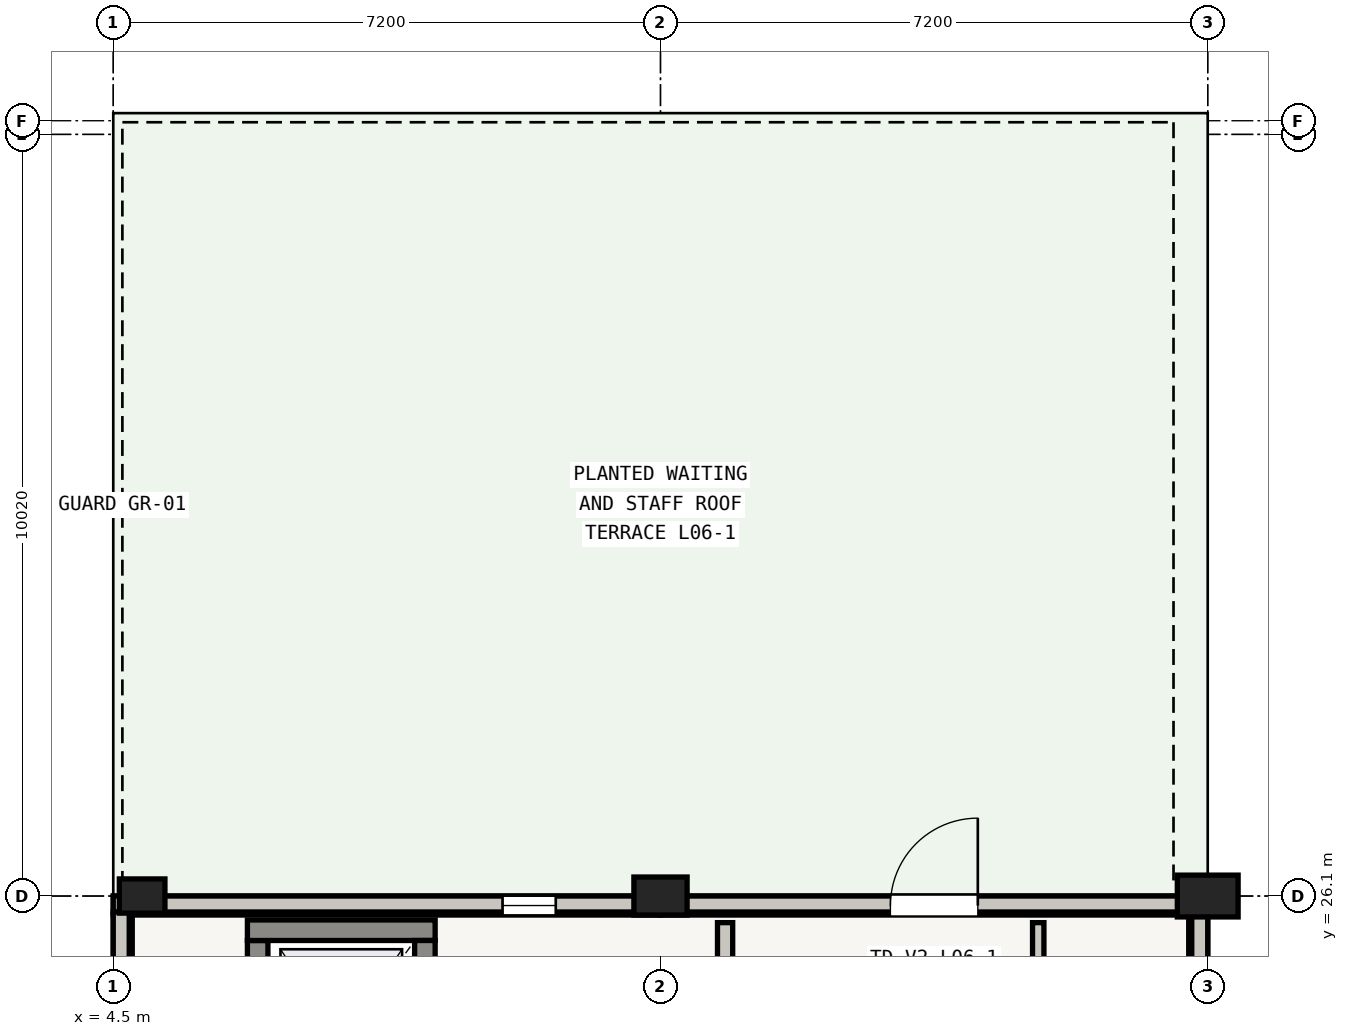
"""IFC4 building model, lengths in metres.
Left out: names, types, materials, properties, quantities, classifications, styles, units other than length and angle.
Written with IfcOpenShell. Run it as: python <this file> out.ifc"""

import sys

from ifc_helpers import new_model, si_unit, direction, frame, frame_2d, origin, origin_2d, place, context, subcontext, project, spatial, rectangle, extrude, element, fill, save


model = new_model("IFC4")
c1 = context("Model", 3, precision=1e-05, world=origin(), true_north=direction((0.0, 1.0)))
c2 = subcontext(c1, "Body", "Model", "MODEL_VIEW")
j1 = project(units=[si_unit("LENGTHUNIT", "METRE"), si_unit("PLANEANGLEUNIT", "RADIAN")], contexts=[c1])
p1 = place(None, origin())
s1 = spatial("IfcSite", under=j1, at=p1, CompositionType="ELEMENT")
p2 = place(p1, origin())
s2 = spatial("IfcBuilding", under=s1, at=p2, CompositionType="ELEMENT")
p3 = place(p2, frame((0.0, 0.0, 25.05)))
s3 = spatial("IfcBuildingStorey", under=s2, at=p3, CompositionType="ELEMENT", Elevation=25.05)
p4 = place(p3, frame((4.88, 26.1, 0.0), z_axis=(0.0, 0.0, 1.0), x_axis=(1.0, 0.0, 0.0)))
e1 = element("IfcColumn", 1, at=p4, inside=s3, PredefinedType="COLUMN", context=c2, shape_type="SweptSolid", body=[
    extrude(rectangle(XDim=0.6, YDim=0.45, at=origin_2d()), origin(), (0.0, 0.0, 1.0), 3.66),
])
p5 = place(p3, frame((11.7, 26.1, 0.0), z_axis=(0.0, 0.0, 1.0), x_axis=(1.0, 0.0, 0.0)))
e2 = element("IfcColumn", 2, at=p5, inside=s3, PredefinedType="COLUMN", context=c2, shape_type="SweptSolid", body=[
    extrude(rectangle(XDim=0.7, YDim=0.5, at=origin_2d()), origin(), (0.0, 0.0, 1.0), 3.66),
])
p6 = place(p3, frame((18.9, 26.1, 0.0), z_axis=(0.0, 0.0, 1.0), x_axis=(1.0, 0.0, 0.0)))
e3 = element("IfcColumn", 3, at=p6, inside=s3, PredefinedType="COLUMN", context=c2, shape_type="SweptSolid", body=[
    extrude(rectangle(XDim=0.8, YDim=0.55, at=origin_2d()), origin(), (0.0, 0.0, 1.0), 3.66),
])
p7 = place(p3, frame((4.5, 25.975, 0.0), z_axis=(0.0, 0.0, 1.0), x_axis=(1.0, 0.0, 0.0)))
e4 = element("IfcWall", 4, at=p7, inside=s3, PredefinedType="STANDARD", context=c2, shape_type="SweptSolid", body=[
    extrude(rectangle(XDim=7.2, YDim=0.25, at=frame_2d((3.6, 0.0))), origin(), (0.0, 0.0, 1.0), 3.145),
])
p8 = place(p7, frame((5.122, 0.0, 0.55)))
e5 = element("IfcOpeningElement", 5, at=p8, cuts=e4, PredefinedType="OPENING", context=c2, shape_type="SweptSolid", body=[
    extrude(rectangle(XDim=0.7, YDim=2.3, at=frame_2d((0.35, 1.15))), frame((0.0, 0.125, 0.0), z_axis=(0.0, -1.0, 0.0), x_axis=(1.0, 0.0, 0.0)), (0.0, 0.0, 1.0), 0.25),
])
p9 = place(p3, frame((11.7, 25.975, 0.0), z_axis=(0.0, 0.0, 1.0), x_axis=(1.0, 0.0, 0.0)))
e6 = element("IfcWall", 6, at=p9, inside=s3, PredefinedType="STANDARD", context=c2, shape_type="SweptSolid", body=[
    extrude(rectangle(XDim=7.2, YDim=0.25, at=frame_2d((3.6, 0.0))), origin(), (0.0, 0.0, 1.0), 3.195),
])
p10 = place(p9, frame((3.025, 0.0, 0.19)))
e7 = element("IfcOpeningElement", 7, at=p10, cuts=e6, PredefinedType="OPENING", context=c2, shape_type="SweptSolid", body=[
    extrude(rectangle(XDim=1.15, YDim=2.02, at=frame_2d((0.575, 1.01))), frame((0.0, 0.125, 0.0), z_axis=(0.0, -1.0, 0.0), x_axis=(1.0, 0.0, 0.0)), (0.0, 0.0, 1.0), 0.25),
])
p11 = place(p3, frame((18.775, 25.85, 0.0), z_axis=(0.0, 0.0, 1.0), x_axis=(0.0, -1.0, 0.0)))
e8 = element("IfcWall", 8, at=p11, inside=s3, PredefinedType="STANDARD", context=c2, shape_type="SweptSolid", body=[
    extrude(rectangle(XDim=6.95, YDim=0.25, at=frame_2d((3.475, 0.0))), origin(), (0.0, 0.0, 1.0), 3.165),
])
p12 = place(p11, frame((1.258, 0.0, 0.55)))
e9 = element("IfcOpeningElement", 9, at=p12, cuts=e8, PredefinedType="OPENING", context=c2, shape_type="SweptSolid", body=[
    extrude(rectangle(XDim=0.82, YDim=2.2, at=frame_2d((0.41, 1.1))), frame((0.0, 0.125, 0.0), z_axis=(0.0, -1.0, 0.0), x_axis=(1.0, 0.0, 0.0)), (0.0, 0.0, 1.0), 0.25),
])
p13 = place(p11, frame((3.065, 0.0, 0.55)))
e10 = element("IfcOpeningElement", 10, at=p13, cuts=e8, PredefinedType="OPENING", context=c2, shape_type="SweptSolid", body=[
    extrude(rectangle(XDim=0.82, YDim=2.2, at=frame_2d((0.41, 1.1))), frame((0.0, 0.125, 0.0), z_axis=(0.0, -1.0, 0.0), x_axis=(1.0, 0.0, 0.0)), (0.0, 0.0, 1.0), 0.25),
])
p14 = place(p11, frame((4.872, 0.0, 0.55)))
e11 = element("IfcOpeningElement", 11, at=p14, cuts=e8, PredefinedType="OPENING", context=c2, shape_type="SweptSolid", body=[
    extrude(rectangle(XDim=0.82, YDim=2.2, at=frame_2d((0.41, 1.1))), frame((0.0, 0.125, 0.0), z_axis=(0.0, -1.0, 0.0), x_axis=(1.0, 0.0, 0.0)), (0.0, 0.0, 1.0), 0.25),
])
p15 = place(p3, frame((4.625, 18.9, 0.0), z_axis=(0.0, 0.0, 1.0), x_axis=(0.0, 1.0, 0.0)))
e12 = element("IfcWall", 12, at=p15, inside=s3, PredefinedType="STANDARD", context=c2, shape_type="SweptSolid", body=[
    extrude(rectangle(XDim=6.95, YDim=0.25, at=frame_2d((3.475, 0.0))), origin(), (0.0, 0.0, 1.0), 3.095),
])
p16 = place(p15, frame((1.268, 0.0, 0.55)))
e13 = element("IfcOpeningElement", 13, at=p16, cuts=e12, PredefinedType="OPENING", context=c2, shape_type="SweptSolid", body=[
    extrude(rectangle(XDim=0.8, YDim=2.16, at=frame_2d((0.4, 1.08))), frame((0.0, 0.125, 0.0), z_axis=(0.0, -1.0, 0.0), x_axis=(1.0, 0.0, 0.0)), (0.0, 0.0, 1.0), 0.25),
])
p17 = place(p15, frame((3.075, 0.0, 0.55)))
e14 = element("IfcOpeningElement", 14, at=p17, cuts=e12, PredefinedType="OPENING", context=c2, shape_type="SweptSolid", body=[
    extrude(rectangle(XDim=0.8, YDim=2.16, at=frame_2d((0.4, 1.08))), frame((0.0, 0.125, 0.0), z_axis=(0.0, -1.0, 0.0), x_axis=(1.0, 0.0, 0.0)), (0.0, 0.0, 1.0), 0.25),
])
p18 = place(p15, frame((4.882, 0.0, 0.55)))
e15 = element("IfcOpeningElement", 15, at=p18, cuts=e12, PredefinedType="OPENING", context=c2, shape_type="SweptSolid", body=[
    extrude(rectangle(XDim=0.8, YDim=2.16, at=frame_2d((0.4, 1.08))), frame((0.0, 0.125, 0.0), z_axis=(0.0, -1.0, 0.0), x_axis=(1.0, 0.0, 0.0)), (0.0, 0.0, 1.0), 0.25),
])
p19 = place(p3, frame((4.5, 25.995, 3.9), z_axis=(0.0, 0.0, 1.0), x_axis=(1.0, 0.0, 0.0)))
e16 = element("IfcWall", 16, at=p19, inside=s3, PredefinedType="PARAPET", context=c2, shape_type="SweptSolid", body=[
    extrude(rectangle(XDim=14.4, YDim=0.21, at=frame_2d((7.2, 0.0))), origin(), (0.0, 0.0, 1.0), 1.1),
])
for number, where, z_axis, x_axis in (
    (17, (18.795, 25.89, 3.9), (0.0, 0.0, 1.0), (0.0, -1.0, 0.0)),
    (18, (4.605, 4.71, 3.9), (0.0, 0.0, 1.0), (0.0, 1.0, 0.0)),
):
    element("IfcWall", number, at=place(p3, frame(where, z_axis=z_axis, x_axis=x_axis)), inside=s3, PredefinedType="PARAPET", context=c2, shape_type="SweptSolid", body=[
        extrude(rectangle(XDim=21.18, YDim=0.21, at=frame_2d((10.59, 0.0))), origin(), (0.0, 0.0, 1.0), 1.1),
    ])
p20 = place(p3, frame((6.4, 22.885, 0.0), z_axis=(0.0, 0.0, 1.0), x_axis=(0.0, 1.0, 0.0)))
e19 = element("IfcWall", 19, at=p20, inside=s3, PredefinedType="SHEAR", context=c2, shape_type="SweptSolid", body=[
    extrude(rectangle(XDim=2.63, YDim=0.27, at=frame_2d((1.315, 0.0))), origin(), (0.0, 0.0, 1.0), 3.62),
])
p21 = place(p3, frame((6.265, 25.65, 0.0), z_axis=(0.0, 0.0, 1.0), x_axis=(1.0, 0.0, 0.0)))
e20 = element("IfcWall", 20, at=p21, inside=s3, PredefinedType="SHEAR", context=c2, shape_type="SweptSolid", body=[
    extrude(rectangle(XDim=2.47, YDim=0.27, at=frame_2d((1.235, 0.0))), origin(), (0.0, 0.0, 1.0), 3.62),
])
p22 = place(p3, frame((8.6, 25.515, 0.0), z_axis=(0.0, 0.0, 1.0), x_axis=(0.0, -1.0, 0.0)))
e21 = element("IfcWall", 21, at=p22, inside=s3, PredefinedType="SHEAR", context=c2, shape_type="SweptSolid", body=[
    extrude(rectangle(XDim=2.63, YDim=0.27, at=frame_2d((1.315, 0.0))), origin(), (0.0, 0.0, 1.0), 3.62),
])
p23 = place(p22, frame((0.755, 0.0, 0.0)))
e22 = element("IfcOpeningElement", 22, at=p23, cuts=e21, PredefinedType="OPENING", context=c2, shape_type="SweptSolid", body=[
    extrude(rectangle(XDim=1.12, YDim=2.1, at=frame_2d((0.56, 1.05))), frame((0.0, 0.135, 0.0), z_axis=(0.0, -1.0, 0.0), x_axis=(1.0, 0.0, 0.0)), (0.0, 0.0, 1.0), 0.27),
])
p24 = place(p3, frame((12.55, 25.75, 0.0), z_axis=(0.0, 0.0, 1.0), x_axis=(0.0, -1.0, 0.0)))
e23 = element("IfcWall", 23, at=p24, inside=s3, PredefinedType="SOLIDWALL", context=c2, shape_type="SweptSolid", body=[
    extrude(rectangle(XDim=2.9, YDim=0.2, at=frame_2d((1.45, 0.0))), origin(), (0.0, 0.0, 1.0), 2.64),
])
p25 = place(p24, frame((0.875, 0.0, 0.0)))
e24 = element("IfcOpeningElement", 24, at=p25, cuts=e23, PredefinedType="OPENING", context=c2, shape_type="SweptSolid", body=[
    extrude(rectangle(XDim=1.15, YDim=2.05, at=frame_2d((0.575, 1.025))), frame((0.0, 0.1, 0.0), z_axis=(0.0, -1.0, 0.0), x_axis=(1.0, 0.0, 0.0)), (0.0, 0.0, 1.0), 0.2),
])
p26 = place(p3, frame((16.67, 15.92, 0.0), z_axis=(0.0, 0.0, 1.0), x_axis=(0.0, 1.0, 0.0)))
e25 = element("IfcWall", 25, at=p26, inside=s3, PredefinedType="PARTITIONING", context=c2, shape_type="SweptSolid", body=[
    extrude(rectangle(XDim=9.83, YDim=0.15, at=frame_2d((4.915, 0.0))), origin(), (0.0, 0.0, 1.0), 2.64),
])
p27 = place(p26, frame((4.415, 0.0, 0.0)))
e26 = element("IfcOpeningElement", 26, at=p27, cuts=e25, PredefinedType="OPENING", context=c2, shape_type="SweptSolid", body=[
    extrude(rectangle(XDim=1.0, YDim=2.05, at=frame_2d((0.5, 1.025))), frame((0.0, 0.075, 0.0), z_axis=(0.0, -1.0, 0.0), x_axis=(1.0, 0.0, 0.0)), (0.0, 0.0, 1.0), 0.15),
])
p28 = place(p8, origin())
e27 = element("IfcWindow", 27, at=p28, inside=s3, PartitioningType="SINGLE_PANEL", PredefinedType="WINDOW", context=c2, shape_type="SweptSolid", body=[
    extrude(rectangle(XDim=0.7, YDim=2.3, at=frame_2d((0.35, 1.15))), frame((0.0, 0.03, 0.0), z_axis=(0.0, -1.0, 0.0), x_axis=(1.0, 0.0, 0.0)), (0.0, 0.0, 1.0), 0.06),
])
fill(e5, e27)
p29 = place(p10, origin())
e28 = element("IfcDoor", 28, at=p29, inside=s3, OperationType="SINGLE_SWING_RIGHT", PredefinedType="DOOR", context=c2, shape_type="SweptSolid", body=[
    extrude(rectangle(XDim=1.15, YDim=2.02, at=frame_2d((0.575, 1.01))), frame((0.0, 0.025, 0.0), z_axis=(0.0, -1.0, 0.0), x_axis=(1.0, 0.0, 0.0)), (0.0, 0.0, 1.0), 0.05),
])
fill(e7, e28)
save(model, sys.argv[1])
